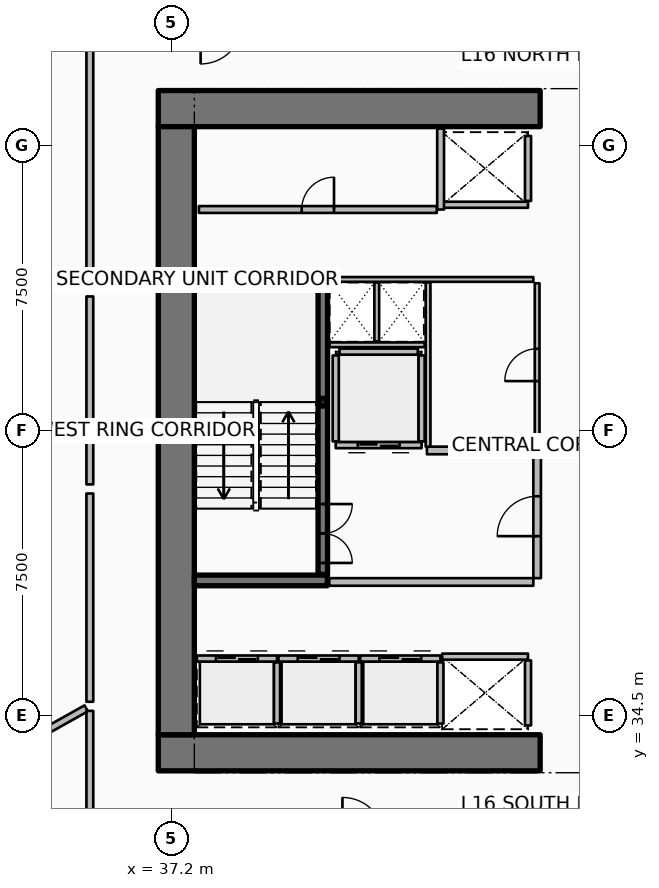
"""IFC4 building model, lengths in metres.
Left out: names, types, materials, properties, quantities, classifications, styles, units other than length and angle.
Written with IfcOpenShell. Run it as: python <this file> out.ifc"""

import sys

from ifc_helpers import new_model, si_unit, direction, frame, frame_2d, origin, origin_2d, place, context, subcontext, project, spatial, rectangle, hollow_rectangle, extrude, element, fill, save


model = new_model("IFC4")
c1 = context("Model", 3, precision=1e-05, world=origin(), true_north=direction((0.0, 1.0)))
c2 = subcontext(c1, "Body", "Model", "MODEL_VIEW")
j1 = project(units=[si_unit("LENGTHUNIT", "METRE"), si_unit("PLANEANGLEUNIT", "RADIAN")], contexts=[c1])
p1 = place(None, origin())
s1 = spatial("IfcSite", under=j1, at=p1, CompositionType="ELEMENT")
p2 = place(p1, origin())
s2 = spatial("IfcBuilding", under=s1, at=p2, CompositionType="ELEMENT")
p3 = place(p2, frame((0.0, 0.0, 67.65)))
s3 = spatial("IfcBuildingStorey", under=s2, at=p3, CompositionType="ELEMENT", Elevation=67.65)
for number, where, z_axis, x_axis in (
    (1, (36.85, 33.525, 0.0), (0.0, 0.0, 1.0), (1.0, 0.0, 0.0)),
    (2, (36.85, 50.475, 0.0), (0.0, 0.0, 1.0), (1.0, 0.0, 0.0)),
):
    element("IfcWall", number, at=place(p3, frame(where, z_axis=z_axis, x_axis=x_axis)), inside=s3, PredefinedType="SHEAR", context=c2, shape_type="SweptSolid", body=[
        extrude(rectangle(XDim=10.05, YDim=0.95, at=frame_2d((5.025, 0.0))), origin(), (0.0, 0.0, 1.0), 3.75),
    ])
p4 = place(p3, frame((37.325, 34.0, 0.0), z_axis=(0.0, 0.0, 1.0), x_axis=(0.0, 1.0, 0.0)))
e3 = element("IfcWall", 3, at=p4, inside=s3, PredefinedType="SHEAR", context=c2, shape_type="SweptSolid", body=[
    extrude(rectangle(XDim=16.0, YDim=0.95, at=frame_2d((8.0, 0.0))), origin(), (0.0, 0.0, 1.0), 3.75),
])
for number, where, z_axis, x_axis in (
    (4, (37.8, 38.06, 0.0), (0.0, 0.0, 1.0), (1.0, 0.0, 0.0)),
    (5, (37.8, 45.94, 0.0), (0.0, 0.0, 1.0), (1.0, 0.0, 0.0)),
):
    element("IfcWall", number, at=place(p3, frame(where, z_axis=z_axis, x_axis=x_axis)), inside=s3, PredefinedType="SHEAR", context=c2, shape_type="SweptSolid", body=[
        extrude(rectangle(XDim=3.5, YDim=0.28, at=frame_2d((1.75, 0.0))), origin(), (0.0, 0.0, 1.0), 3.75),
    ])
p5 = place(p3, frame((41.18, 42.75, 0.0), z_axis=(0.0, 0.0, 1.0), x_axis=(1.0, 0.0, 0.0)))
e6 = element("IfcColumn", 6, at=p5, inside=s3, PredefinedType="COLUMN", context=c2, shape_type="SweptSolid", body=[
    extrude(hollow_rectangle(XDim=0.2, YDim=0.2, WallThickness=0.01, InnerFilletRadius=0.01, OuterFilletRadius=0.02, at=origin_2d()), origin(), (0.0, 0.0, 1.0), 1.67),
])
p6 = place(p3, frame((41.18, 38.22, 0.0), z_axis=(0.0, 0.0, 1.0), x_axis=(0.0, 1.0, 0.0)))
e7 = element("IfcWall", 7, at=p6, inside=s3, PredefinedType="SOLIDWALL", context=c2, shape_type="SweptSolid", body=[
    extrude(rectangle(XDim=7.56, YDim=0.25, at=frame_2d((3.78, 0.0))), origin(), (0.0, 0.0, 1.0), 3.35),
])
p7 = place(p6, frame((0.3, 0.0, 0.0)))
e8 = element("IfcOpeningElement", 8, at=p7, cuts=e7, PredefinedType="OPENING", context=c2, shape_type="SweptSolid", body=[
    extrude(rectangle(XDim=1.55, YDim=2.15, at=frame_2d((0.775, 1.075))), frame((0.0, 0.135, 0.0), z_axis=(0.0, -1.0, 0.0), x_axis=(1.0, 0.0, 0.0)), (0.0, 0.0, 1.0), 0.27),
])
p8 = place(p3, frame((37.865, 36.005, 0.0), z_axis=(0.0, 0.0, 1.0), x_axis=(1.0, 0.0, 0.0)))
e9 = element("IfcWall", 9, at=p8, inside=s3, PredefinedType="PARTITIONING", context=c2, shape_type="SweptSolid", body=[
    extrude(rectangle(XDim=2.11, YDim=0.16, at=frame_2d((1.055, 0.0))), origin(), (0.0, 0.0, 1.0), 3.35),
])
p9 = place(p8, frame((0.505, 0.0, 0.0)))
e10 = element("IfcOpeningElement", 10, at=p9, cuts=e9, PredefinedType="OPENING", context=c2, shape_type="SweptSolid", body=[
    extrude(rectangle(XDim=1.1, YDim=2.1, at=frame_2d((0.55, 1.05))), frame((0.0, 0.09, 0.0), z_axis=(0.0, -1.0, 0.0), x_axis=(1.0, 0.0, 0.0)), (0.0, 0.0, 1.0), 0.18),
])
p10 = place(p3, frame((39.975, 34.295, 0.0), z_axis=(0.0, 0.0, 1.0), x_axis=(0.0, 1.0, 0.0)))
e11 = element("IfcWall", 11, at=p10, inside=s3, PredefinedType="PARTITIONING", context=c2, shape_type="SweptSolid", body=[
    extrude(rectangle(XDim=1.61, YDim=0.16, at=frame_2d((0.805, 0.0))), origin(), (0.0, 0.0, 1.0), 3.35),
])
p11 = place(p3, frame((40.015, 36.005, 0.0), z_axis=(0.0, 0.0, 1.0), x_axis=(1.0, 0.0, 0.0)))
e12 = element("IfcWall", 12, at=p11, inside=s3, PredefinedType="PARTITIONING", context=c2, shape_type="SweptSolid", body=[
    extrude(rectangle(XDim=2.11, YDim=0.16, at=frame_2d((1.055, 0.0))), origin(), (0.0, 0.0, 1.0), 3.35),
])
p12 = place(p11, frame((0.505, 0.0, 0.0)))
e13 = element("IfcOpeningElement", 13, at=p12, cuts=e12, PredefinedType="OPENING", context=c2, shape_type="SweptSolid", body=[
    extrude(rectangle(XDim=1.1, YDim=2.1, at=frame_2d((0.55, 1.05))), frame((0.0, 0.09, 0.0), z_axis=(0.0, -1.0, 0.0), x_axis=(1.0, 0.0, 0.0)), (0.0, 0.0, 1.0), 0.18),
])
p13 = place(p3, frame((42.125, 34.295, 0.0), z_axis=(0.0, 0.0, 1.0), x_axis=(0.0, 1.0, 0.0)))
e14 = element("IfcWall", 14, at=p13, inside=s3, PredefinedType="PARTITIONING", context=c2, shape_type="SweptSolid", body=[
    extrude(rectangle(XDim=1.61, YDim=0.16, at=frame_2d((0.805, 0.0))), origin(), (0.0, 0.0, 1.0), 3.35),
])
p14 = place(p3, frame((42.165, 36.005, 0.0), z_axis=(0.0, 0.0, 1.0), x_axis=(1.0, 0.0, 0.0)))
e15 = element("IfcWall", 15, at=p14, inside=s3, PredefinedType="PARTITIONING", context=c2, shape_type="SweptSolid", body=[
    extrude(rectangle(XDim=2.11, YDim=0.16, at=frame_2d((1.055, 0.0))), origin(), (0.0, 0.0, 1.0), 3.35),
])
p15 = place(p14, frame((0.505, 0.0, 0.0)))
e16 = element("IfcOpeningElement", 16, at=p15, cuts=e15, PredefinedType="OPENING", context=c2, shape_type="SweptSolid", body=[
    extrude(rectangle(XDim=1.1, YDim=2.1, at=frame_2d((0.55, 1.05))), frame((0.0, 0.09, 0.0), z_axis=(0.0, -1.0, 0.0), x_axis=(1.0, 0.0, 0.0)), (0.0, 0.0, 1.0), 0.18),
])
p16 = place(p3, frame((44.275, 34.295, 0.0), z_axis=(0.0, 0.0, 1.0), x_axis=(0.0, 1.0, 0.0)))
e17 = element("IfcWall", 17, at=p16, inside=s3, PredefinedType="PARTITIONING", context=c2, shape_type="SweptSolid", body=[
    extrude(rectangle(XDim=1.61, YDim=0.16, at=frame_2d((0.805, 0.0))), origin(), (0.0, 0.0, 1.0), 3.35),
])
p17 = place(p3, frame((46.58, 47.945, 0.0), z_axis=(0.0, 0.0, 1.0), x_axis=(-1.0, 0.0, 0.0)))
e18 = element("IfcWall", 18, at=p17, inside=s3, PredefinedType="PARTITIONING", context=c2, shape_type="SweptSolid", body=[
    extrude(rectangle(XDim=2.26, YDim=0.16, at=frame_2d((1.13, 0.0))), origin(), (0.0, 0.0, 1.0), 3.35),
])
p18 = place(p3, frame((46.58, 48.045, 0.0), z_axis=(0.0, 0.0, 1.0), x_axis=(0.0, 1.0, 0.0)))
e19 = element("IfcWall", 19, at=p18, inside=s3, PredefinedType="PARTITIONING", context=c2, shape_type="SweptSolid", body=[
    extrude(rectangle(XDim=1.71, YDim=0.16, at=frame_2d((0.855, 0.0))), origin(), (0.0, 0.0, 1.0), 3.35),
])
p19 = place(p3, frame((44.32, 36.055, 0.0), z_axis=(0.0, 0.0, 1.0), x_axis=(1.0, 0.0, 0.0)))
e20 = element("IfcWall", 20, at=p19, inside=s3, PredefinedType="PARTITIONING", context=c2, shape_type="SweptSolid", body=[
    extrude(rectangle(XDim=2.26, YDim=0.16, at=frame_2d((1.13, 0.0))), origin(), (0.0, 0.0, 1.0), 3.35),
])
p20 = place(p3, frame((46.58, 34.245, 0.0), z_axis=(0.0, 0.0, 1.0), x_axis=(0.0, 1.0, 0.0)))
e21 = element("IfcWall", 21, at=p20, inside=s3, PredefinedType="PARTITIONING", context=c2, shape_type="SweptSolid", body=[
    extrude(rectangle(XDim=1.71, YDim=0.16, at=frame_2d((0.855, 0.0))), origin(), (0.0, 0.0, 1.0), 3.35),
])
p21 = place(p3, frame((43.78, 41.62, 0.0), z_axis=(0.0, 0.0, 1.0), x_axis=(-1.0, 0.0, 0.0)))
e22 = element("IfcWall", 22, at=p21, inside=s3, PredefinedType="PARTITIONING", context=c2, shape_type="SweptSolid", body=[
    extrude(rectangle(XDim=2.26, YDim=0.16, at=frame_2d((1.13, 0.0))), origin(), (0.0, 0.0, 1.0), 3.35),
])
p22 = place(p21, frame((0.58, 0.0, 0.0)))
e23 = element("IfcOpeningElement", 23, at=p22, cuts=e22, PredefinedType="OPENING", context=c2, shape_type="SweptSolid", body=[
    extrude(rectangle(XDim=1.1, YDim=2.1, at=frame_2d((0.55, 1.05))), frame((0.0, 0.09, 0.0), z_axis=(0.0, -1.0, 0.0), x_axis=(1.0, 0.0, 0.0)), (0.0, 0.0, 1.0), 0.18),
])
for number, where, z_axis, x_axis in (
    (24, (43.78, 41.72, 0.0), (0.0, 0.0, 1.0), (0.0, 1.0, 0.0)),
    (25, (41.52, 41.72, 0.0), (0.0, 0.0, 1.0), (0.0, 1.0, 0.0)),
):
    element("IfcWall", number, at=place(p3, frame(where, z_axis=z_axis, x_axis=x_axis)), inside=s3, PredefinedType="PARTITIONING", context=c2, shape_type="SweptSolid", body=[
        extrude(rectangle(XDim=2.26, YDim=0.16, at=frame_2d((1.13, 0.0))), origin(), (0.0, 0.0, 1.0), 3.35),
    ])
p23 = place(p3, frame((41.62, 44.08, 0.0), z_axis=(0.0, 0.0, 1.0), x_axis=(1.0, 0.0, 0.0)))
e26 = element("IfcWall", 26, at=p23, inside=s3, PredefinedType="PARTITIONING", context=c2, shape_type="SweptSolid", body=[
    extrude(rectangle(XDim=2.06, YDim=0.16, at=frame_2d((1.03, 0.0))), origin(), (0.0, 0.0, 1.0), 3.35),
])
p24 = place(p3, frame((37.92, 47.82, 0.0), z_axis=(0.0, 0.0, 1.0), x_axis=(1.0, 0.0, 0.0)))
e27 = element("IfcWall", 27, at=p24, inside=s3, PredefinedType="PARTITIONING", context=c2, shape_type="SweptSolid", body=[
    extrude(rectangle(XDim=6.26, YDim=0.18, at=frame_2d((3.13, 0.0))), origin(), (0.0, 0.0, 1.0), 3.35),
])
p25 = place(p24, frame((2.705, 0.0, 0.0)))
e28 = element("IfcOpeningElement", 28, at=p25, cuts=e27, PredefinedType="OPENING", context=c2, shape_type="SweptSolid", body=[
    extrude(rectangle(XDim=0.85, YDim=2.06, at=frame_2d((0.425, 1.03))), frame((0.0, 0.1, 0.0), z_axis=(0.0, -1.0, 0.0), x_axis=(1.0, 0.0, 0.0)), (0.0, 0.0, 1.0), 0.2),
])
p26 = place(p3, frame((44.28, 47.82, 0.0), z_axis=(0.0, 0.0, 1.0), x_axis=(0.0, 1.0, 0.0)))
e29 = element("IfcWall", 29, at=p26, inside=s3, PredefinedType="PARTITIONING", context=c2, shape_type="SweptSolid", body=[
    extrude(rectangle(XDim=2.13, YDim=0.18, at=frame_2d((1.065, 0.0))), origin(), (0.0, 0.0, 1.0), 3.35),
])
p27 = place(p3, frame((41.35, 38.02, 0.0), z_axis=(0.0, 0.0, 1.0), x_axis=(1.0, 0.0, 0.0)))
e30 = element("IfcWall", 30, at=p27, inside=s3, PredefinedType="PARTITIONING", context=c2, shape_type="SweptSolid", body=[
    extrude(rectangle(XDim=5.37, YDim=0.2, at=frame_2d((2.685, 0.0))), origin(), (0.0, 0.0, 1.0), 3.35),
])
p28 = place(p3, frame((43.92, 41.48, 0.0), z_axis=(0.0, 0.0, 1.0), x_axis=(1.0, 0.0, 0.0)))
e31 = element("IfcWall", 31, at=p28, inside=s3, PredefinedType="PARTITIONING", context=c2, shape_type="SweptSolid", body=[
    extrude(rectangle(XDim=2.8, YDim=0.2, at=frame_2d((1.4, 0.0))), origin(), (0.0, 0.0, 1.0), 3.35),
])
p29 = place(p3, frame((46.82, 38.12, 0.0), z_axis=(0.0, 0.0, 1.0), x_axis=(0.0, 1.0, 0.0)))
e32 = element("IfcWall", 32, at=p29, inside=s3, PredefinedType="PARTITIONING", context=c2, shape_type="SweptSolid", body=[
    extrude(rectangle(XDim=3.26, YDim=0.2, at=frame_2d((1.63, 0.0))), origin(), (0.0, 0.0, 1.0), 3.35),
])
p30 = place(p29, frame((1.105, 0.0, 0.0)))
e33 = element("IfcOpeningElement", 33, at=p30, cuts=e32, PredefinedType="OPENING", context=c2, shape_type="SweptSolid", body=[
    extrude(rectangle(XDim=1.05, YDim=2.1, at=frame_2d((0.525, 1.05))), frame((0.0, 0.11, 0.0), z_axis=(0.0, -1.0, 0.0), x_axis=(1.0, 0.0, 0.0)), (0.0, 0.0, 1.0), 0.22),
])
p31 = place(p3, frame((41.36, 45.98, 0.0), z_axis=(0.0, 0.0, 1.0), x_axis=(1.0, 0.0, 0.0)))
e34 = element("IfcWall", 34, at=p31, inside=s3, PredefinedType="PARTITIONING", context=c2, shape_type="SweptSolid", body=[
    extrude(rectangle(XDim=5.36, YDim=0.125, at=frame_2d((2.68, 0.0))), origin(), (0.0, 0.0, 1.0), 2.79),
])
p32 = place(p3, frame((41.36, 44.26, 0.0), z_axis=(0.0, 0.0, 1.0), x_axis=(1.0, 0.0, 0.0)))
e35 = element("IfcWall", 35, at=p32, inside=s3, PredefinedType="PARTITIONING", context=c2, shape_type="SweptSolid", body=[
    extrude(rectangle(XDim=2.5, YDim=0.125, at=frame_2d((1.25, 0.0))), origin(), (0.0, 0.0, 1.0), 2.79),
])
p33 = place(p3, frame((42.6, 44.35, 0.0), z_axis=(0.0, 0.0, 1.0), x_axis=(0.0, 1.0, 0.0)))
e36 = element("IfcWall", 36, at=p33, inside=s3, PredefinedType="PARTITIONING", context=c2, shape_type="SweptSolid", body=[
    extrude(rectangle(XDim=1.55, YDim=0.125, at=frame_2d((0.775, 0.0))), origin(), (0.0, 0.0, 1.0), 2.79),
])
p34 = place(p3, frame((43.95, 41.58, 0.0), z_axis=(0.0, 0.0, 1.0), x_axis=(0.0, 1.0, 0.0)))
e37 = element("IfcWall", 37, at=p34, inside=s3, PredefinedType="PARTITIONING", context=c2, shape_type="SweptSolid", body=[
    extrude(rectangle(XDim=4.32, YDim=0.125, at=frame_2d((2.16, 0.0))), origin(), (0.0, 0.0, 1.0), 2.79),
])
p35 = place(p3, frame((46.82, 41.58, 0.0), z_axis=(0.0, 0.0, 1.0), x_axis=(0.0, 1.0, 0.0)))
e38 = element("IfcWall", 38, at=p35, inside=s3, PredefinedType="PARTITIONING", context=c2, shape_type="SweptSolid", body=[
    extrude(rectangle(XDim=4.3, YDim=0.125, at=frame_2d((2.15, 0.0))), origin(), (0.0, 0.0, 1.0), 2.79),
])
p36 = place(p35, frame((1.725, 0.0, 0.0)))
e39 = element("IfcOpeningElement", 39, at=p36, cuts=e38, PredefinedType="OPENING", context=c2, shape_type="SweptSolid", body=[
    extrude(rectangle(XDim=0.85, YDim=2.06, at=frame_2d((0.425, 1.03))), frame((0.0, 0.073, 0.0), z_axis=(0.0, -1.0, 0.0), x_axis=(1.0, 0.0, 0.0)), (0.0, 0.0, 1.0), 0.145),
])
p37 = place(p3, frame((34.954, 34.694, 0.0), z_axis=(0.0, 0.0, 1.0), x_axis=(-0.872493465611, -0.488625779577, 0.0)))
e40 = element("IfcWall", 40, at=p37, inside=s3, PredefinedType="PARTITIONING", context=c2, shape_type="SweptSolid", body=[
    extrude(rectangle(XDim=16.586, YDim=0.18, at=frame_2d((8.293, 0.0))), origin(), (0.0, 0.0, 1.0), 2.717),
])
p38 = place(p3, frame((35.05, 52.089, 0.0), z_axis=(0.0, 0.0, 1.0), x_axis=(0.0, -1.0, 0.0)))
e41 = element("IfcWall", 41, at=p38, inside=s3, PredefinedType="PARTITIONING", context=c2, shape_type="SweptSolid", body=[
    extrude(rectangle(XDim=6.317, YDim=0.18, at=frame_2d((3.158, 0.0))), origin(), (0.0, 0.0, 1.0), 2.717),
])
p39 = place(p3, frame((35.05, 45.532, 0.0), z_axis=(0.0, 0.0, 1.0), x_axis=(0.0, -1.0, 0.0)))
e42 = element("IfcWall", 42, at=p39, inside=s3, PredefinedType="PARTITIONING", context=c2, shape_type="SweptSolid", body=[
    extrude(rectangle(XDim=4.945, YDim=0.18, at=frame_2d((2.472, 0.0))), origin(), (0.0, 0.0, 1.0), 2.717),
])
p40 = place(p3, frame((35.05, 40.347, 0.0), z_axis=(0.0, 0.0, 1.0), x_axis=(0.0, -1.0, 0.0)))
e43 = element("IfcWall", 43, at=p40, inside=s3, PredefinedType="PARTITIONING", context=c2, shape_type="SweptSolid", body=[
    extrude(rectangle(XDim=5.48, YDim=0.18, at=frame_2d((2.74, 0.0))), origin(), (0.0, 0.0, 1.0), 2.717),
])
p41 = place(p3, frame((35.05, 34.628, 0.0), z_axis=(0.0, 0.0, 1.0), x_axis=(0.0, -1.0, 0.0)))
e44 = element("IfcWall", 44, at=p41, inside=s3, PredefinedType="PARTITIONING", context=c2, shape_type="SweptSolid", body=[
    extrude(rectangle(XDim=3.258, YDim=0.18, at=frame_2d((1.629, 0.0))), origin(), (0.0, 0.0, 1.0), 2.717),
])
p42 = place(p7, origin())
e45 = element("IfcDoor", 45, at=p42, inside=s3, OperationType="DOUBLE_DOOR_SINGLE_SWING", PredefinedType="DOOR", context=c2, shape_type="SweptSolid", body=[
    extrude(rectangle(XDim=1.55, YDim=2.15, at=frame_2d((0.775, 1.075))), frame((0.0, 0.025, 0.0), z_axis=(0.0, -1.0, 0.0), x_axis=(1.0, 0.0, 0.0)), (0.0, 0.0, 1.0), 0.05),
])
fill(e8, e45)
p43 = place(p9, origin())
e46 = element("IfcDoor", 46, at=p43, inside=s3, OperationType="DOUBLE_DOOR_SLIDING", PredefinedType="DOOR", context=c2, shape_type="SweptSolid", body=[
    extrude(rectangle(XDim=1.1, YDim=2.1, at=frame_2d((0.55, 1.05))), frame((0.0, 0.025, 0.0), z_axis=(0.0, -1.0, 0.0), x_axis=(1.0, 0.0, 0.0)), (0.0, 0.0, 1.0), 0.05),
])
fill(e10, e46)
p44 = place(p12, origin())
e47 = element("IfcDoor", 47, at=p44, inside=s3, OperationType="DOUBLE_DOOR_SLIDING", PredefinedType="DOOR", context=c2, shape_type="SweptSolid", body=[
    extrude(rectangle(XDim=1.1, YDim=2.1, at=frame_2d((0.55, 1.05))), frame((0.0, 0.025, 0.0), z_axis=(0.0, -1.0, 0.0), x_axis=(1.0, 0.0, 0.0)), (0.0, 0.0, 1.0), 0.05),
])
fill(e13, e47)
p45 = place(p15, origin())
e48 = element("IfcDoor", 48, at=p45, inside=s3, OperationType="DOUBLE_DOOR_SLIDING", PredefinedType="DOOR", context=c2, shape_type="SweptSolid", body=[
    extrude(rectangle(XDim=1.1, YDim=2.1, at=frame_2d((0.55, 1.05))), frame((0.0, 0.025, 0.0), z_axis=(0.0, -1.0, 0.0), x_axis=(1.0, 0.0, 0.0)), (0.0, 0.0, 1.0), 0.05),
])
fill(e16, e48)
p46 = place(p22, origin())
e49 = element("IfcDoor", 49, at=p46, inside=s3, OperationType="DOUBLE_DOOR_SLIDING", PredefinedType="DOOR", context=c2, shape_type="SweptSolid", body=[
    extrude(rectangle(XDim=1.1, YDim=2.1, at=frame_2d((0.55, 1.05))), frame((0.0, 0.025, 0.0), z_axis=(0.0, -1.0, 0.0), x_axis=(1.0, 0.0, 0.0)), (0.0, 0.0, 1.0), 0.05),
])
fill(e23, e49)
p47 = place(p25, origin())
e50 = element("IfcDoor", 50, at=p47, inside=s3, OperationType="SINGLE_SWING_RIGHT", PredefinedType="DOOR", context=c2, shape_type="SweptSolid", body=[
    extrude(rectangle(XDim=0.85, YDim=2.06, at=frame_2d((0.425, 1.03))), frame((0.0, 0.025, 0.0), z_axis=(0.0, -1.0, 0.0), x_axis=(1.0, 0.0, 0.0)), (0.0, 0.0, 1.0), 0.05),
])
fill(e28, e50)
p48 = place(p30, origin())
e51 = element("IfcDoor", 51, at=p48, inside=s3, OperationType="SINGLE_SWING_LEFT", PredefinedType="DOOR", context=c2, shape_type="SweptSolid", body=[
    extrude(rectangle(XDim=1.05, YDim=2.1, at=frame_2d((0.525, 1.05))), frame((0.0, 0.025, 0.0), z_axis=(0.0, -1.0, 0.0), x_axis=(1.0, 0.0, 0.0)), (0.0, 0.0, 1.0), 0.05),
])
fill(e33, e51)
p49 = place(p36, origin())
e52 = element("IfcDoor", 52, at=p49, inside=s3, OperationType="SINGLE_SWING_LEFT", PredefinedType="DOOR", context=c2, shape_type="SweptSolid", body=[
    extrude(rectangle(XDim=0.85, YDim=2.06, at=frame_2d((0.425, 1.03))), frame((0.0, 0.025, 0.0), z_axis=(0.0, -1.0, 0.0), x_axis=(1.0, 0.0, 0.0)), (0.0, 0.0, 1.0), 0.05),
])
fill(e39, e52)
save(model, sys.argv[1])
